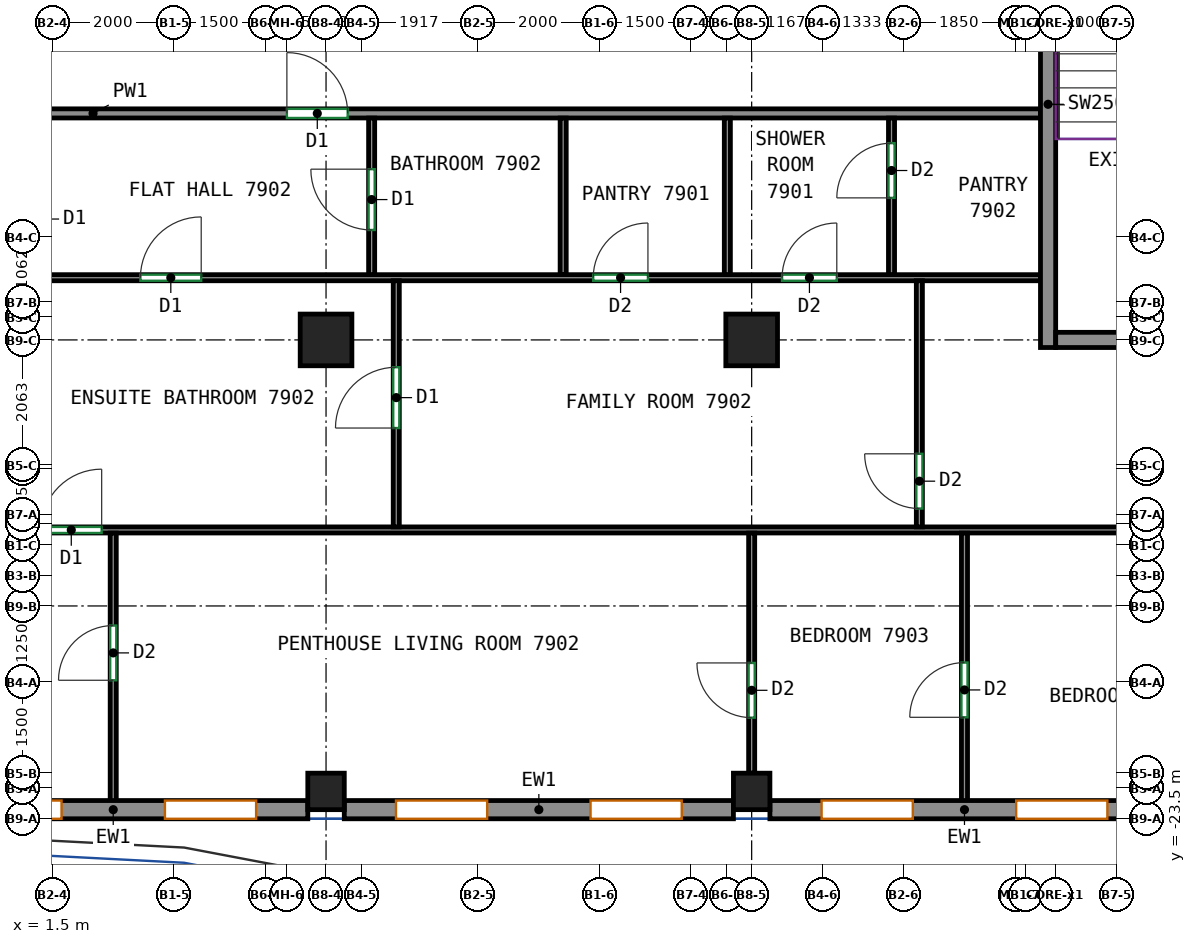
"""IFC4 building model, lengths in metres.
Left out: names, types, materials, properties, quantities, classifications, styles, units other than length and angle.
Written with IfcOpenShell. Run it as: python <this file> out.ifc"""

import sys

from ifc_helpers import new_model, si_unit, direction, frame, frame_2d, origin, origin_2d, place, context, subcontext, project, spatial, rectangle, extrude, source, transform, mapped, element, fill, save


model = new_model("IFC4")
c1 = context("Model", 3, precision=1e-05, world=origin(), true_north=direction((0.0, 1.0)))
c2 = subcontext(c1, "Body", "Model", "MODEL_VIEW")
j1 = project(units=[si_unit("LENGTHUNIT", "METRE"), si_unit("PLANEANGLEUNIT", "RADIAN")], contexts=[c1])
p1 = place(None, origin())
s1 = spatial("IfcSite", under=j1, at=p1, CompositionType="ELEMENT")
p2 = place(p1, origin())
s2 = spatial("IfcBuilding", under=s1, at=p2, CompositionType="ELEMENT")
p3 = place(p2, frame((0.0, 0.0, 315.4)))
s3 = spatial("IfcBuildingStorey", under=s2, at=p3, CompositionType="ELEMENT", Elevation=315.4)
m1 = source(origin(), c2, "Body", "SweptSolid", [
    extrude(rectangle(XDim=0.6, YDim=0.6, at=origin_2d()), origin(), (0.0, 0.0, 1.0), 3.0),
])
p4 = place(p3, frame((6.0, -23.05, 0.0), z_axis=(0.0, 0.0, 1.0), x_axis=(1.0, 0.0, 0.0)))
e1 = element("IfcColumn", 1, at=p4, inside=s3, PredefinedType="COLUMN", context=c2, shape_type="MappedRepresentation", body=[
    mapped(m1, transform((0.0, 0.0, 0.0))),
])
m2 = source(origin(), c2, "Body", "SweptSolid", [
    extrude(rectangle(XDim=0.85, YDim=0.85, at=origin_2d()), origin(), (0.0, 0.0, 1.0), 3.0),
])
p5 = place(p3, frame((6.0, -15.625, 0.0), z_axis=(0.0, 0.0, 1.0), x_axis=(1.0, 0.0, 0.0)))
e2 = element("IfcColumn", 2, at=p5, inside=s3, PredefinedType="COLUMN", context=c2, shape_type="MappedRepresentation", body=[
    mapped(m2, transform((0.0, 0.0, 0.0))),
])
p6 = place(p3, frame((13.0, -23.05, 0.0), z_axis=(0.0, 0.0, 1.0), x_axis=(1.0, 0.0, 0.0)))
e3 = element("IfcColumn", 3, at=p6, inside=s3, PredefinedType="COLUMN", context=c2, shape_type="MappedRepresentation", body=[
    mapped(m1, transform((0.0, 0.0, 0.0))),
])
p7 = place(p3, frame((13.0, -15.625, 0.0), z_axis=(0.0, 0.0, 1.0), x_axis=(1.0, 0.0, 0.0)))
e4 = element("IfcColumn", 4, at=p7, inside=s3, PredefinedType="COLUMN", context=c2, shape_type="MappedRepresentation", body=[
    mapped(m2, transform((0.0, 0.0, 0.0))),
])
m3 = source(origin(), c2, "Body", "SweptSolid", [
    extrude(rectangle(XDim=8.0, YDim=0.25, at=frame_2d((4.0, 0.0))), origin(), (0.0, 0.0, 1.0), 3.0),
])
p8 = place(p3, frame((17.875, -15.75, 0.0), z_axis=(0.0, 0.0, 1.0), x_axis=(0.0, 1.0, 0.0)))
e5 = element("IfcWall", 5, at=p8, inside=s3, PredefinedType="SHEAR", context=c2, shape_type="MappedRepresentation", body=[
    mapped(m3, transform((0.0, 0.0, 0.0))),
])
m4 = source(origin(), c2, "Body", "SweptSolid", [
    extrude(rectangle(XDim=3.7, YDim=0.25, at=frame_2d((1.85, 0.0))), origin(), (0.0, 0.0, 1.0), 3.0),
])
p9 = place(p3, frame((18.0, -15.625, 0.0), z_axis=(0.0, 0.0, 1.0), x_axis=(1.0, 0.0, 0.0)))
e6 = element("IfcWall", 6, at=p9, inside=s3, PredefinedType="SHEAR", context=c2, shape_type="MappedRepresentation", body=[
    mapped(m4, transform((0.0, 0.0, 0.0))),
])
m5 = source(origin(), c2, "Body", "SweptSolid", [
    extrude(rectangle(XDim=6.4, YDim=0.3, at=frame_2d((3.2, 0.0))), origin(), (0.0, 0.0, 1.0), 3.0),
])
p10 = place(p3, frame((-0.7, -23.35, 0.0), z_axis=(0.0, 0.0, 1.0), x_axis=(1.0, 0.0, 0.0)))
e7 = element("IfcWall", 7, at=p10, inside=s3, PredefinedType="SOLIDWALL", context=c2, shape_type="MappedRepresentation", body=[
    mapped(m5, transform((0.0, 0.0, 0.0))),
])
p11 = place(p10, frame((0.85, 0.0, 0.8)))
e8 = element("IfcOpeningElement", 8, at=p11, cuts=e7, PredefinedType="OPENING", context=c2, shape_type="SweptSolid", body=[
    extrude(rectangle(XDim=1.5, YDim=2.05, at=frame_2d((0.75, 1.025))), frame((0.0, 0.16, 0.0), z_axis=(0.0, -1.0, 0.0), x_axis=(1.0, 0.0, 0.0)), (0.0, 0.0, 1.0), 0.32),
])
p12 = place(p10, frame((4.05, 0.0, 0.8)))
e9 = element("IfcOpeningElement", 9, at=p12, cuts=e7, PredefinedType="OPENING", context=c2, shape_type="SweptSolid", body=[
    extrude(rectangle(XDim=1.5, YDim=2.05, at=frame_2d((0.75, 1.025))), frame((0.0, 0.16, 0.0), z_axis=(0.0, -1.0, 0.0), x_axis=(1.0, 0.0, 0.0)), (0.0, 0.0, 1.0), 0.32),
])
p13 = place(p3, frame((6.3, -23.35, 0.0), z_axis=(0.0, 0.0, 1.0), x_axis=(1.0, 0.0, 0.0)))
e10 = element("IfcWall", 10, at=p13, inside=s3, PredefinedType="SOLIDWALL", context=c2, shape_type="MappedRepresentation", body=[
    mapped(m5, transform((0.0, 0.0, 0.0))),
])
p14 = place(p13, frame((0.85, 0.0, 0.8)))
e11 = element("IfcOpeningElement", 11, at=p14, cuts=e10, PredefinedType="OPENING", context=c2, shape_type="SweptSolid", body=[
    extrude(rectangle(XDim=1.5, YDim=2.05, at=frame_2d((0.75, 1.025))), frame((0.0, 0.16, 0.0), z_axis=(0.0, -1.0, 0.0), x_axis=(1.0, 0.0, 0.0)), (0.0, 0.0, 1.0), 0.32),
])
p15 = place(p13, frame((4.05, 0.0, 0.8)))
e12 = element("IfcOpeningElement", 12, at=p15, cuts=e10, PredefinedType="OPENING", context=c2, shape_type="SweptSolid", body=[
    extrude(rectangle(XDim=1.5, YDim=2.05, at=frame_2d((0.75, 1.025))), frame((0.0, 0.16, 0.0), z_axis=(0.0, -1.0, 0.0), x_axis=(1.0, 0.0, 0.0)), (0.0, 0.0, 1.0), 0.32),
])
p16 = place(p3, frame((13.3, -23.35, 0.0), z_axis=(0.0, 0.0, 1.0), x_axis=(1.0, 0.0, 0.0)))
e13 = element("IfcWall", 13, at=p16, inside=s3, PredefinedType="SOLIDWALL", context=c2, shape_type="MappedRepresentation", body=[
    mapped(m5, transform((0.0, 0.0, 0.0))),
])
p17 = place(p16, frame((0.85, 0.0, 0.8)))
e14 = element("IfcOpeningElement", 14, at=p17, cuts=e13, PredefinedType="OPENING", context=c2, shape_type="SweptSolid", body=[
    extrude(rectangle(XDim=1.5, YDim=2.05, at=frame_2d((0.75, 1.025))), frame((0.0, 0.16, 0.0), z_axis=(0.0, -1.0, 0.0), x_axis=(1.0, 0.0, 0.0)), (0.0, 0.0, 1.0), 0.32),
])
p18 = place(p16, frame((4.05, 0.0, 0.8)))
e15 = element("IfcOpeningElement", 15, at=p18, cuts=e13, PredefinedType="OPENING", context=c2, shape_type="SweptSolid", body=[
    extrude(rectangle(XDim=1.5, YDim=2.05, at=frame_2d((0.75, 1.025))), frame((0.0, 0.16, 0.0), z_axis=(0.0, -1.0, 0.0), x_axis=(1.0, 0.0, 0.0)), (0.0, 0.0, 1.0), 0.32),
])
p19 = place(p3, frame((-4.51, -11.9, 0.0), z_axis=(0.0, 0.0, 1.0), x_axis=(1.0, 0.0, 0.0)))
e16 = element("IfcWall", 16, at=p19, inside=s3, PredefinedType="PARTITIONING", context=c2, shape_type="SweptSolid", body=[
    extrude(rectangle(XDim=22.26, YDim=0.15, at=frame_2d((11.13, 0.0))), origin(), (0.0, 0.0, 1.0), 3.0),
])
p20 = place(p19, frame((9.866, 0.0, 0.0)))
e17 = element("IfcOpeningElement", 17, at=p20, cuts=e16, PredefinedType="OPENING", context=c2, shape_type="SweptSolid", body=[
    extrude(rectangle(XDim=1.0, YDim=2.1, at=frame_2d((0.5, 1.05))), frame((0.0, 0.085, 0.0), z_axis=(0.0, -1.0, 0.0), x_axis=(1.0, 0.0, 0.0)), (0.0, 0.0, 1.0), 0.17),
])
p21 = place(p3, frame((-1.41, -14.602, 0.0), z_axis=(0.0, 0.0, 1.0), x_axis=(1.0, 0.0, 0.0)))
e18 = element("IfcWall", 18, at=p21, inside=s3, PredefinedType="PARTITIONING", context=c2, shape_type="SweptSolid", body=[
    extrude(rectangle(XDim=19.16, YDim=0.1, at=frame_2d((9.58, 0.0))), origin(), (0.0, 0.0, 1.0), 3.0),
])
p22 = place(p21, frame((4.357, 0.0, 0.0)))
e19 = element("IfcOpeningElement", 19, at=p22, cuts=e18, PredefinedType="OPENING", context=c2, shape_type="SweptSolid", body=[
    extrude(rectangle(XDim=1.0, YDim=2.1, at=frame_2d((0.5, 1.05))), frame((0.0, 0.06, 0.0), z_axis=(0.0, -1.0, 0.0), x_axis=(1.0, 0.0, 0.0)), (0.0, 0.0, 1.0), 0.12),
])
p23 = place(p21, frame((11.804, 0.0, 0.0)))
e20 = element("IfcOpeningElement", 20, at=p23, cuts=e18, PredefinedType="OPENING", context=c2, shape_type="SweptSolid", body=[
    extrude(rectangle(XDim=0.9, YDim=2.1, at=frame_2d((0.45, 1.05))), frame((0.0, 0.06, 0.0), z_axis=(0.0, -1.0, 0.0), x_axis=(1.0, 0.0, 0.0)), (0.0, 0.0, 1.0), 0.12),
])
p24 = place(p21, frame((14.91, 0.0, 0.0)))
e21 = element("IfcOpeningElement", 21, at=p24, cuts=e18, PredefinedType="OPENING", context=c2, shape_type="SweptSolid", body=[
    extrude(rectangle(XDim=0.9, YDim=2.1, at=frame_2d((0.45, 1.05))), frame((0.0, 0.06, 0.0), z_axis=(0.0, -1.0, 0.0), x_axis=(1.0, 0.0, 0.0)), (0.0, 0.0, 1.0), 0.12),
])
p25 = place(p3, frame((-4.6, -18.75, 0.0), z_axis=(0.0, 0.0, 1.0), x_axis=(1.0, 0.0, 0.0)))
e22 = element("IfcWall", 22, at=p25, inside=s3, PredefinedType="PARTITIONING", context=c2, shape_type="SweptSolid", body=[
    extrude(rectangle(XDim=27.85, YDim=0.1, at=frame_2d((13.925, 0.0))), origin(), (0.0, 0.0, 1.0), 3.0),
])
p26 = place(p25, frame((3.741, 0.0, 0.0)))
e23 = element("IfcOpeningElement", 23, at=p26, cuts=e22, PredefinedType="OPENING", context=c2, shape_type="SweptSolid", body=[
    extrude(rectangle(XDim=0.9, YDim=2.1, at=frame_2d((0.45, 1.05))), frame((0.0, 0.06, 0.0), z_axis=(0.0, -1.0, 0.0), x_axis=(1.0, 0.0, 0.0)), (0.0, 0.0, 1.0), 0.12),
])
p27 = place(p25, frame((5.91, 0.0, 0.0)))
e24 = element("IfcOpeningElement", 24, at=p27, cuts=e22, PredefinedType="OPENING", context=c2, shape_type="SweptSolid", body=[
    extrude(rectangle(XDim=1.0, YDim=2.1, at=frame_2d((0.5, 1.05))), frame((0.0, 0.06, 0.0), z_axis=(0.0, -1.0, 0.0), x_axis=(1.0, 0.0, 0.0)), (0.0, 0.0, 1.0), 0.12),
])
p28 = place(p3, frame((7.155, -18.7, 0.0), z_axis=(0.0, 0.0, 1.0), x_axis=(0.0, 1.0, 0.0)))
e25 = element("IfcWall", 25, at=p28, inside=s3, PredefinedType="PARTITIONING", context=c2, shape_type="SweptSolid", body=[
    extrude(rectangle(XDim=4.048, YDim=0.1, at=frame_2d((2.024, 0.0))), origin(), (0.0, 0.0, 1.0), 3.0),
])
p29 = place(p28, frame((1.626, 0.0, 0.0)))
e26 = element("IfcOpeningElement", 26, at=p29, cuts=e25, PredefinedType="OPENING", context=c2, shape_type="SweptSolid", body=[
    extrude(rectangle(XDim=1.0, YDim=2.1, at=frame_2d((0.5, 1.05))), frame((0.0, 0.06, 0.0), z_axis=(0.0, -1.0, 0.0), x_axis=(1.0, 0.0, 0.0)), (0.0, 0.0, 1.0), 0.12),
])
p30 = place(p3, frame((15.758, -18.7, 0.0), z_axis=(0.0, 0.0, 1.0), x_axis=(0.0, 1.0, 0.0)))
e27 = element("IfcWall", 27, at=p30, inside=s3, PredefinedType="PARTITIONING", context=c2, shape_type="SweptSolid", body=[
    extrude(rectangle(XDim=4.048, YDim=0.1, at=frame_2d((2.024, 0.0))), origin(), (0.0, 0.0, 1.0), 3.0),
])
p31 = place(p30, frame((0.302, 0.0, 0.0)))
e28 = element("IfcOpeningElement", 28, at=p31, cuts=e27, PredefinedType="OPENING", context=c2, shape_type="SweptSolid", body=[
    extrude(rectangle(XDim=0.9, YDim=2.1, at=frame_2d((0.45, 1.05))), frame((0.0, 0.06, 0.0), z_axis=(0.0, -1.0, 0.0), x_axis=(1.0, 0.0, 0.0)), (0.0, 0.0, 1.0), 0.12),
])
p32 = place(p3, frame((6.75, -14.55, 0.0), z_axis=(0.0, 0.0, 1.0), x_axis=(0.0, 1.0, 0.0)))
e29 = element("IfcWall", 29, at=p32, inside=s3, PredefinedType="PARTITIONING", context=c2, shape_type="SweptSolid", body=[
    extrude(rectangle(XDim=2.573, YDim=0.1, at=frame_2d((1.287, 0.0))), origin(), (0.0, 0.0, 1.0), 3.0),
])
p33 = place(p32, frame((0.733, 0.0, 0.0)))
e30 = element("IfcOpeningElement", 30, at=p33, cuts=e29, PredefinedType="OPENING", context=c2, shape_type="SweptSolid", body=[
    extrude(rectangle(XDim=1.0, YDim=2.1, at=frame_2d((0.5, 1.05))), frame((0.0, 0.06, 0.0), z_axis=(0.0, -1.0, 0.0), x_axis=(1.0, 0.0, 0.0)), (0.0, 0.0, 1.0), 0.12),
])
for number, where, z_axis, x_axis in (
    (31, (9.9, -14.55, 0.0), (0.0, 0.0, 1.0), (0.0, 1.0, 0.0)),
    (32, (12.6, -14.55, 0.0), (0.0, 0.0, 1.0), (0.0, 1.0, 0.0)),
):
    element("IfcWall", number, at=place(p3, frame(where, z_axis=z_axis, x_axis=x_axis)), inside=s3, PredefinedType="PARTITIONING", context=c2, shape_type="SweptSolid", body=[
        extrude(rectangle(XDim=2.573, YDim=0.1, at=frame_2d((1.287, 0.0))), origin(), (0.0, 0.0, 1.0), 3.0),
    ])
p34 = place(p3, frame((15.3, -14.55, 0.0), z_axis=(0.0, 0.0, 1.0), x_axis=(0.0, 1.0, 0.0)))
e33 = element("IfcWall", 33, at=p34, inside=s3, PredefinedType="PARTITIONING", context=c2, shape_type="SweptSolid", body=[
    extrude(rectangle(XDim=2.573, YDim=0.1, at=frame_2d((1.287, 0.0))), origin(), (0.0, 0.0, 1.0), 3.0),
])
p35 = place(p34, frame((1.261, 0.0, 0.0)))
e34 = element("IfcOpeningElement", 34, at=p35, cuts=e33, PredefinedType="OPENING", context=c2, shape_type="SweptSolid", body=[
    extrude(rectangle(XDim=0.9, YDim=2.1, at=frame_2d((0.45, 1.05))), frame((0.0, 0.06, 0.0), z_axis=(0.0, -1.0, 0.0), x_axis=(1.0, 0.0, 0.0)), (0.0, 0.0, 1.0), 0.12),
])
p36 = place(p3, frame((2.5, -23.25, 0.0), z_axis=(0.0, 0.0, 1.0), x_axis=(0.0, 1.0, 0.0)))
e35 = element("IfcWall", 35, at=p36, inside=s3, PredefinedType="PARTITIONING", context=c2, shape_type="SweptSolid", body=[
    extrude(rectangle(XDim=4.448, YDim=0.1, at=frame_2d((2.224, 0.0))), origin(), (0.0, 0.0, 1.0), 3.0),
])
p37 = place(p36, frame((2.028, 0.0, 0.0)))
e36 = element("IfcOpeningElement", 36, at=p37, cuts=e35, PredefinedType="OPENING", context=c2, shape_type="SweptSolid", body=[
    extrude(rectangle(XDim=0.9, YDim=2.1, at=frame_2d((0.45, 1.05))), frame((0.0, 0.06, 0.0), z_axis=(0.0, -1.0, 0.0), x_axis=(1.0, 0.0, 0.0)), (0.0, 0.0, 1.0), 0.12),
])
p38 = place(p3, frame((13.0, -22.75, 0.0), z_axis=(0.0, 0.0, 1.0), x_axis=(0.0, 1.0, 0.0)))
e37 = element("IfcWall", 37, at=p38, inside=s3, PredefinedType="PARTITIONING", context=c2, shape_type="SweptSolid", body=[
    extrude(rectangle(XDim=3.948, YDim=0.1, at=frame_2d((1.974, 0.0))), origin(), (0.0, 0.0, 1.0), 3.0),
])
p39 = place(p38, frame((0.913, 0.0, 0.0)))
e38 = element("IfcOpeningElement", 38, at=p39, cuts=e37, PredefinedType="OPENING", context=c2, shape_type="SweptSolid", body=[
    extrude(rectangle(XDim=0.9, YDim=2.1, at=frame_2d((0.45, 1.05))), frame((0.0, 0.06, 0.0), z_axis=(0.0, -1.0, 0.0), x_axis=(1.0, 0.0, 0.0)), (0.0, 0.0, 1.0), 0.12),
])
p40 = place(p3, frame((16.5, -23.25, 0.0), z_axis=(0.0, 0.0, 1.0), x_axis=(0.0, 1.0, 0.0)))
e39 = element("IfcWall", 39, at=p40, inside=s3, PredefinedType="PARTITIONING", context=c2, shape_type="SweptSolid", body=[
    extrude(rectangle(XDim=4.448, YDim=0.1, at=frame_2d((2.224, 0.0))), origin(), (0.0, 0.0, 1.0), 3.0),
])
p41 = place(p40, frame((1.419, 0.0, 0.0)))
e40 = element("IfcOpeningElement", 40, at=p41, cuts=e39, PredefinedType="OPENING", context=c2, shape_type="SweptSolid", body=[
    extrude(rectangle(XDim=0.9, YDim=2.1, at=frame_2d((0.45, 1.05))), frame((0.0, 0.06, 0.0), z_axis=(0.0, -1.0, 0.0), x_axis=(1.0, 0.0, 0.0)), (0.0, 0.0, 1.0), 0.12),
])
p42 = place(p11, origin())
e41 = element("IfcWindow", 41, at=p42, inside=s3, PartitioningType="SINGLE_PANEL", PredefinedType="WINDOW", context=c2, shape_type="SweptSolid", body=[
    extrude(rectangle(XDim=1.5, YDim=2.05, at=frame_2d((0.75, 1.025))), frame((0.0, 0.03, 0.0), z_axis=(0.0, -1.0, 0.0), x_axis=(1.0, 0.0, 0.0)), (0.0, 0.0, 1.0), 0.06),
])
fill(e8, e41)
p43 = place(p12, origin())
e42 = element("IfcWindow", 42, at=p43, inside=s3, PartitioningType="SINGLE_PANEL", PredefinedType="WINDOW", context=c2, shape_type="SweptSolid", body=[
    extrude(rectangle(XDim=1.5, YDim=2.05, at=frame_2d((0.75, 1.025))), frame((0.0, 0.03, 0.0), z_axis=(0.0, -1.0, 0.0), x_axis=(1.0, 0.0, 0.0)), (0.0, 0.0, 1.0), 0.06),
])
fill(e9, e42)
p44 = place(p14, origin())
e43 = element("IfcWindow", 43, at=p44, inside=s3, PartitioningType="SINGLE_PANEL", PredefinedType="WINDOW", context=c2, shape_type="SweptSolid", body=[
    extrude(rectangle(XDim=1.5, YDim=2.05, at=frame_2d((0.75, 1.025))), frame((0.0, 0.03, 0.0), z_axis=(0.0, -1.0, 0.0), x_axis=(1.0, 0.0, 0.0)), (0.0, 0.0, 1.0), 0.06),
])
fill(e11, e43)
p45 = place(p15, origin())
e44 = element("IfcWindow", 44, at=p45, inside=s3, PartitioningType="SINGLE_PANEL", PredefinedType="WINDOW", context=c2, shape_type="SweptSolid", body=[
    extrude(rectangle(XDim=1.5, YDim=2.05, at=frame_2d((0.75, 1.025))), frame((0.0, 0.03, 0.0), z_axis=(0.0, -1.0, 0.0), x_axis=(1.0, 0.0, 0.0)), (0.0, 0.0, 1.0), 0.06),
])
fill(e12, e44)
p46 = place(p17, origin())
e45 = element("IfcWindow", 45, at=p46, inside=s3, PartitioningType="SINGLE_PANEL", PredefinedType="WINDOW", context=c2, shape_type="SweptSolid", body=[
    extrude(rectangle(XDim=1.5, YDim=2.05, at=frame_2d((0.75, 1.025))), frame((0.0, 0.03, 0.0), z_axis=(0.0, -1.0, 0.0), x_axis=(1.0, 0.0, 0.0)), (0.0, 0.0, 1.0), 0.06),
])
fill(e14, e45)
p47 = place(p18, origin())
e46 = element("IfcWindow", 46, at=p47, inside=s3, PartitioningType="SINGLE_PANEL", PredefinedType="WINDOW", context=c2, shape_type="SweptSolid", body=[
    extrude(rectangle(XDim=1.5, YDim=2.05, at=frame_2d((0.75, 1.025))), frame((0.0, 0.03, 0.0), z_axis=(0.0, -1.0, 0.0), x_axis=(1.0, 0.0, 0.0)), (0.0, 0.0, 1.0), 0.06),
])
fill(e15, e46)
p48 = place(p39, origin())
e47 = element("IfcDoor", 47, at=p48, inside=s3, OperationType="SINGLE_SWING_RIGHT", PredefinedType="DOOR", context=c2, shape_type="SweptSolid", body=[
    extrude(rectangle(XDim=0.9, YDim=2.1, at=frame_2d((0.45, 1.05))), frame((0.0, 0.025, 0.0), z_axis=(0.0, -1.0, 0.0), x_axis=(1.0, 0.0, 0.0)), (0.0, 0.0, 1.0), 0.05),
])
fill(e38, e47)
p49 = place(p41, origin())
e48 = element("IfcDoor", 48, at=p49, inside=s3, OperationType="SINGLE_SWING_LEFT", PredefinedType="DOOR", context=c2, shape_type="SweptSolid", body=[
    extrude(rectangle(XDim=0.9, YDim=2.1, at=frame_2d((0.45, 1.05))), frame((0.0, 0.025, 0.0), z_axis=(0.0, -1.0, 0.0), x_axis=(1.0, 0.0, 0.0)), (0.0, 0.0, 1.0), 0.05),
])
fill(e40, e48)
p50 = place(p37, origin())
e49 = element("IfcDoor", 49, at=p50, inside=s3, OperationType="SINGLE_SWING_LEFT", PredefinedType="DOOR", context=c2, shape_type="SweptSolid", body=[
    extrude(rectangle(XDim=0.9, YDim=2.1, at=frame_2d((0.45, 1.05))), frame((0.0, 0.025, 0.0), z_axis=(0.0, -1.0, 0.0), x_axis=(1.0, 0.0, 0.0)), (0.0, 0.0, 1.0), 0.05),
])
fill(e36, e49)
p51 = place(p27, origin())
e50 = element("IfcDoor", 50, at=p51, inside=s3, OperationType="SINGLE_SWING_RIGHT", PredefinedType="DOOR", context=c2, shape_type="SweptSolid", body=[
    extrude(rectangle(XDim=1.0, YDim=2.1, at=frame_2d((0.5, 1.05))), frame((0.0, 0.025, 0.0), z_axis=(0.0, -1.0, 0.0), x_axis=(1.0, 0.0, 0.0)), (0.0, 0.0, 1.0), 0.05),
])
fill(e24, e50)
p52 = place(p31, origin())
e51 = element("IfcDoor", 51, at=p52, inside=s3, OperationType="SINGLE_SWING_RIGHT", PredefinedType="DOOR", context=c2, shape_type="SweptSolid", body=[
    extrude(rectangle(XDim=0.9, YDim=2.1, at=frame_2d((0.45, 1.05))), frame((0.0, 0.025, 0.0), z_axis=(0.0, -1.0, 0.0), x_axis=(1.0, 0.0, 0.0)), (0.0, 0.0, 1.0), 0.05),
])
fill(e28, e51)
p53 = place(p29, origin())
e52 = element("IfcDoor", 52, at=p53, inside=s3, OperationType="SINGLE_SWING_LEFT", PredefinedType="DOOR", context=c2, shape_type="SweptSolid", body=[
    extrude(rectangle(XDim=1.0, YDim=2.1, at=frame_2d((0.5, 1.05))), frame((0.0, 0.025, 0.0), z_axis=(0.0, -1.0, 0.0), x_axis=(1.0, 0.0, 0.0)), (0.0, 0.0, 1.0), 0.05),
])
fill(e26, e52)
p54 = place(p22, origin())
e53 = element("IfcDoor", 53, at=p54, inside=s3, OperationType="SINGLE_SWING_RIGHT", PredefinedType="DOOR", context=c2, shape_type="SweptSolid", body=[
    extrude(rectangle(XDim=1.0, YDim=2.1, at=frame_2d((0.5, 1.05))), frame((0.0, 0.025, 0.0), z_axis=(0.0, -1.0, 0.0), x_axis=(1.0, 0.0, 0.0)), (0.0, 0.0, 1.0), 0.05),
])
fill(e19, e53)
p55 = place(p23, origin())
e54 = element("IfcDoor", 54, at=p55, inside=s3, OperationType="SINGLE_SWING_RIGHT", PredefinedType="DOOR", context=c2, shape_type="SweptSolid", body=[
    extrude(rectangle(XDim=0.9, YDim=2.1, at=frame_2d((0.45, 1.05))), frame((0.0, 0.025, 0.0), z_axis=(0.0, -1.0, 0.0), x_axis=(1.0, 0.0, 0.0)), (0.0, 0.0, 1.0), 0.05),
])
fill(e20, e54)
p56 = place(p24, origin())
e55 = element("IfcDoor", 55, at=p56, inside=s3, OperationType="SINGLE_SWING_RIGHT", PredefinedType="DOOR", context=c2, shape_type="SweptSolid", body=[
    extrude(rectangle(XDim=0.9, YDim=2.1, at=frame_2d((0.45, 1.05))), frame((0.0, 0.025, 0.0), z_axis=(0.0, -1.0, 0.0), x_axis=(1.0, 0.0, 0.0)), (0.0, 0.0, 1.0), 0.05),
])
fill(e21, e55)
p57 = place(p33, origin())
e56 = element("IfcDoor", 56, at=p57, inside=s3, OperationType="SINGLE_SWING_RIGHT", PredefinedType="DOOR", context=c2, shape_type="SweptSolid", body=[
    extrude(rectangle(XDim=1.0, YDim=2.1, at=frame_2d((0.5, 1.05))), frame((0.0, 0.025, 0.0), z_axis=(0.0, -1.0, 0.0), x_axis=(1.0, 0.0, 0.0)), (0.0, 0.0, 1.0), 0.05),
])
fill(e30, e56)
p58 = place(p35, origin())
e57 = element("IfcDoor", 57, at=p58, inside=s3, OperationType="SINGLE_SWING_LEFT", PredefinedType="DOOR", context=c2, shape_type="SweptSolid", body=[
    extrude(rectangle(XDim=0.9, YDim=2.1, at=frame_2d((0.45, 1.05))), frame((0.0, 0.025, 0.0), z_axis=(0.0, -1.0, 0.0), x_axis=(1.0, 0.0, 0.0)), (0.0, 0.0, 1.0), 0.05),
])
fill(e34, e57)
p59 = place(p20, origin())
e58 = element("IfcDoor", 58, at=p59, inside=s3, OperationType="SINGLE_SWING_LEFT", PredefinedType="DOOR", context=c2, shape_type="SweptSolid", body=[
    extrude(rectangle(XDim=1.0, YDim=2.1, at=frame_2d((0.5, 1.05))), frame((0.0, 0.025, 0.0), z_axis=(0.0, -1.0, 0.0), x_axis=(1.0, 0.0, 0.0)), (0.0, 0.0, 1.0), 0.05),
])
fill(e17, e58)
save(model, sys.argv[1])
